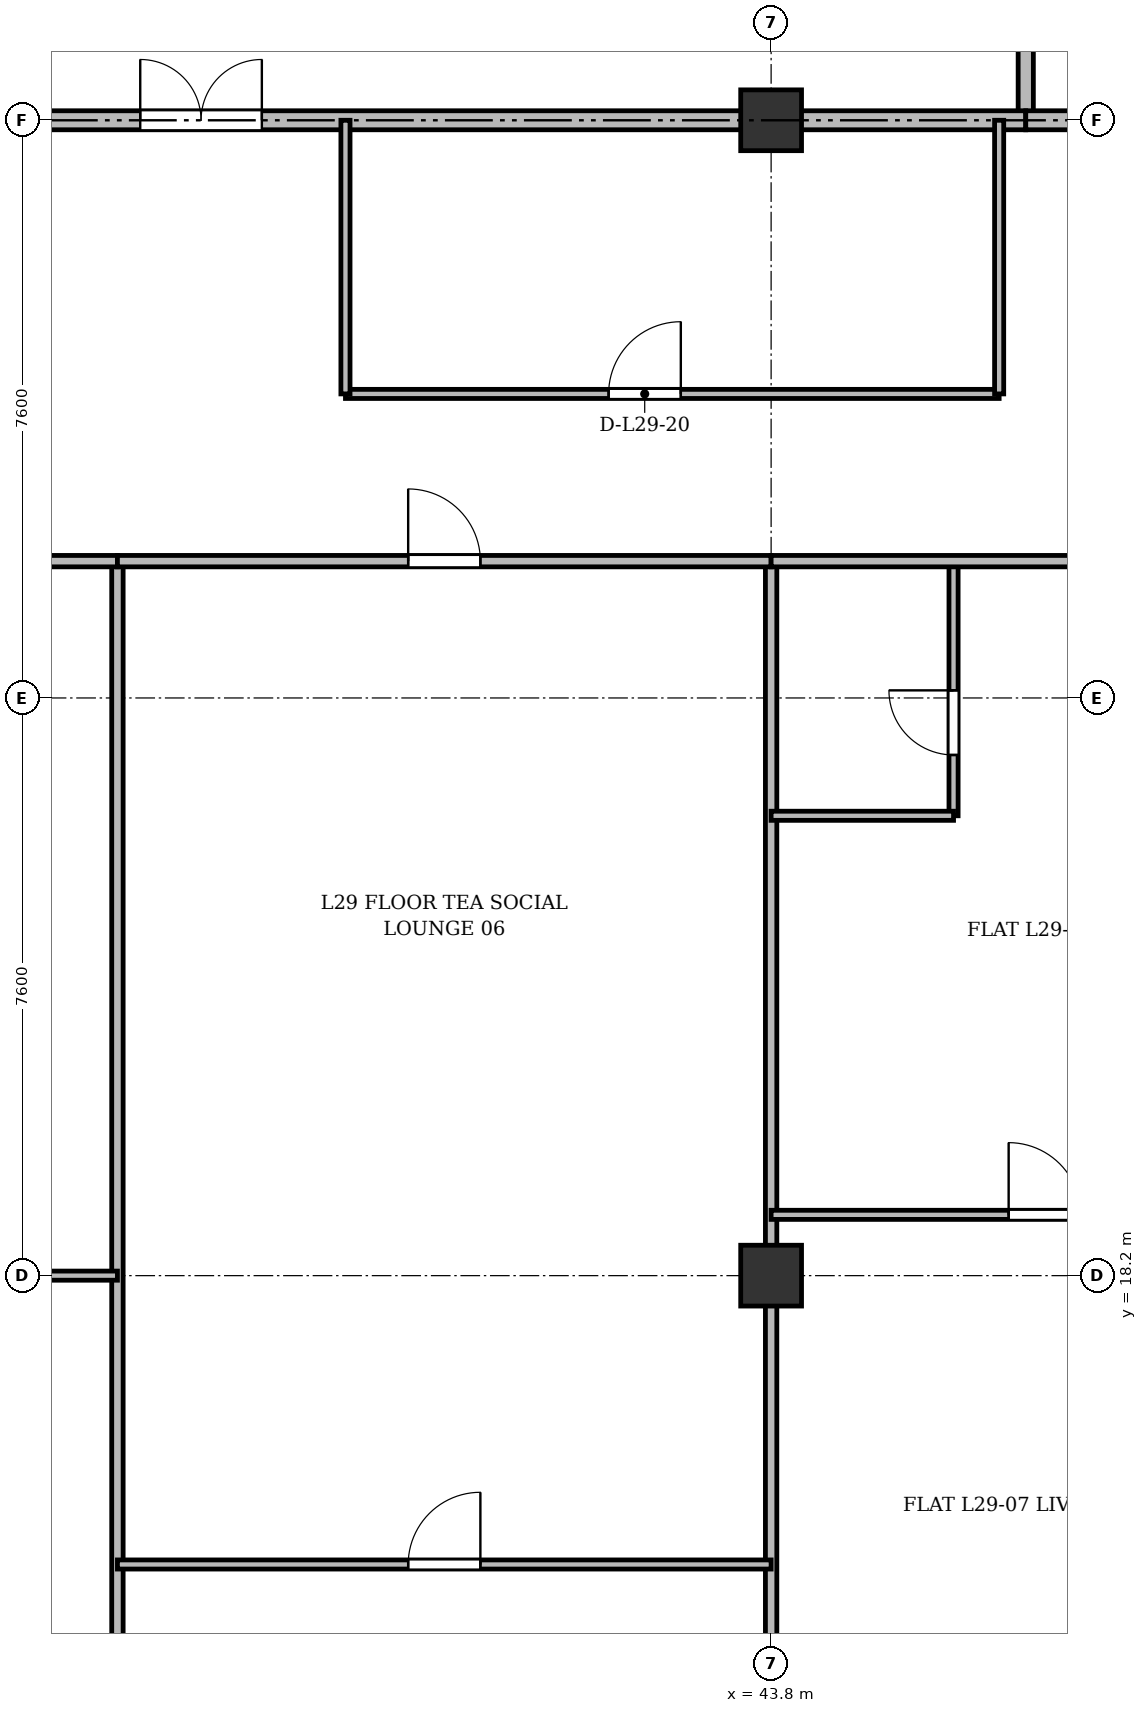
"""IFC4 building model, lengths in metres.
Left out: names, types, materials, properties, quantities, classifications, styles, units other than length and angle.
Written with IfcOpenShell. Run it as: python <this file> out.ifc"""

import sys

from ifc_helpers import new_model, si_unit, direction, frame, frame_2d, origin, origin_2d, place, context, subcontext, project, spatial, rectangle, extrude, source, transform, mapped, element, fill, save


model = new_model("IFC4")
c1 = context("Model", 3, precision=1e-05, world=origin(), true_north=direction((0.0, 1.0)))
c2 = subcontext(c1, "Body", "Model", "MODEL_VIEW")
j1 = project(units=[si_unit("LENGTHUNIT", "METRE"), si_unit("PLANEANGLEUNIT", "RADIAN")], contexts=[c1])
p1 = place(None, origin())
s1 = spatial("IfcSite", under=j1, at=p1, CompositionType="ELEMENT")
p2 = place(p1, origin())
s2 = spatial("IfcBuilding", under=s1, at=p2, CompositionType="ELEMENT")
p3 = place(p2, frame((0.0, 0.0, 114.1)))
s3 = spatial("IfcBuildingStorey", under=s2, at=p3, CompositionType="ELEMENT", Elevation=114.1)
m1 = source(origin(), c2, "Body", "SweptSolid", [
    extrude(rectangle(XDim=0.8, YDim=0.8, at=origin_2d()), origin(), (0.0, 0.0, 1.0), 3.6),
])
for number, where, z_axis, x_axis in (
    (1, (43.8, 18.2, 0.0), (0.0, 0.0, 1.0), (1.0, 0.0, 0.0)),
    (2, (43.8, 33.4, 0.0), (0.0, 0.0, 1.0), (1.0, 0.0, 0.0)),
):
    element("IfcColumn", number, at=place(p3, frame(where, z_axis=z_axis, x_axis=x_axis)), inside=s3, PredefinedType="COLUMN", context=c2, shape_type="MappedRepresentation", body=[
        mapped(m1, transform((0.0, 0.0, 0.0), x_axis=(1.0, 0.0, 0.0), y_axis=(0.0, 1.0, 0.0), z_axis=(0.0, 0.0, 1.0), scale=1.0)),
    ])
p4 = place(p3, frame((47.15, 33.4, 0.0), z_axis=(0.0, 0.0, 1.0), x_axis=(0.0, 1.0, 0.0)))
e3 = element("IfcWall", 3, at=p4, inside=s3, PredefinedType="SOLIDWALL", context=c2, shape_type="SweptSolid", body=[
    extrude(rectangle(XDim=11.3, YDim=0.2, at=frame_2d((5.65, 0.0))), origin(), (0.0, 0.0, 1.0), 2.752),
])
p5 = place(p3, frame((26.3, 33.4, 0.0), z_axis=(0.0, 0.0, 1.0), x_axis=(1.0, 0.0, 0.0)))
e4 = element("IfcWall", 4, at=p5, inside=s3, PredefinedType="PARTITIONING", context=c2, shape_type="SweptSolid", body=[
    extrude(rectangle(XDim=20.85, YDim=0.25, at=frame_2d((10.425, 0.0))), origin(), (0.0, 0.0, 1.0), 2.752),
])
p6 = place(p5, frame((9.2, 0.0, 0.0)))
e5 = element("IfcOpeningElement", 5, at=p6, cuts=e4, PredefinedType="OPENING", context=c2, shape_type="SweptSolid", body=[
    extrude(rectangle(XDim=1.6, YDim=2.2, at=frame_2d((0.8, 1.1))), frame((0.0, 0.135, 0.0), z_axis=(0.0, -1.0, 0.0), x_axis=(1.0, 0.0, 0.0)), (0.0, 0.0, 1.0), 0.27),
])
p7 = place(p3, frame((47.15, 33.4, 0.0), z_axis=(0.0, 0.0, 1.0), x_axis=(1.0, 0.0, 0.0)))
e6 = element("IfcWall", 6, at=p7, inside=s3, PredefinedType="PARTITIONING", context=c2, shape_type="SweptSolid", body=[
    extrude(rectangle(XDim=11.15, YDim=0.25, at=frame_2d((5.575, 0.0))), origin(), (0.0, 0.0, 1.0), 2.752),
])
p8 = place(p7, frame((0.7, 0.0, 0.0)))
e7 = element("IfcOpeningElement", 7, at=p8, cuts=e6, PredefinedType="OPENING", context=c2, shape_type="SweptSolid", body=[
    extrude(rectangle(XDim=0.95, YDim=2.15, at=frame_2d((0.475, 1.075))), frame((0.0, 0.135, 0.0), z_axis=(0.0, -1.0, 0.0), x_axis=(1.0, 0.0, 0.0)), (0.0, 0.0, 1.0), 0.27),
])
p9 = place(p7, frame((6.0, 0.0, 0.0)))
e8 = element("IfcOpeningElement", 8, at=p9, cuts=e6, PredefinedType="OPENING", context=c2, shape_type="SweptSolid", body=[
    extrude(rectangle(XDim=1.2, YDim=2.15, at=frame_2d((0.6, 1.075))), frame((0.0, 0.135, 0.0), z_axis=(0.0, -1.0, 0.0), x_axis=(1.0, 0.0, 0.0)), (0.0, 0.0, 1.0), 0.27),
])
p10 = place(p3, frame((38.2, 29.8, 0.0), z_axis=(0.0, 0.0, 1.0), x_axis=(1.0, 0.0, 0.0)))
e9 = element("IfcWall", 9, at=p10, inside=s3, PredefinedType="PARTITIONING", context=c2, shape_type="SweptSolid", body=[
    extrude(rectangle(XDim=8.6, YDim=0.12, at=frame_2d((4.3, 0.0))), origin(), (0.0, 0.0, 1.0), 2.84),
])
p11 = place(p10, frame((3.462, 0.0, 0.0)))
e10 = element("IfcOpeningElement", 10, at=p11, cuts=e9, PredefinedType="OPENING", context=c2, shape_type="SweptSolid", body=[
    extrude(rectangle(XDim=0.95, YDim=2.15, at=frame_2d((0.475, 1.075))), frame((0.0, 0.07, 0.0), z_axis=(0.0, -1.0, 0.0), x_axis=(1.0, 0.0, 0.0)), (0.0, 0.0, 1.0), 0.14),
])
for number, where, z_axis, x_axis in (
    (11, (38.2, 29.8, 0.0), (0.0, 0.0, 1.0), (0.0, 1.0, 0.0)),
    (12, (46.8, 29.8, 0.0), (0.0, 0.0, 1.0), (0.0, 1.0, 0.0)),
):
    element("IfcWall", number, at=place(p3, frame(where, z_axis=z_axis, x_axis=x_axis)), inside=s3, PredefinedType="PARTITIONING", context=c2, shape_type="SweptSolid", body=[
        extrude(rectangle(XDim=3.6, YDim=0.12, at=frame_2d((1.8, 0.0))), origin(), (0.0, 0.0, 1.0), 2.752),
    ])
p12 = place(p3, frame((35.2, 3.145, 0.0), z_axis=(0.0, 0.0, 1.0), x_axis=(0.0, 1.0, 0.0)))
e13 = element("IfcWall", 13, at=p12, inside=s3, PredefinedType="PARTITIONING", context=c2, shape_type="SweptSolid", body=[
    extrude(rectangle(XDim=24.455, YDim=0.15, at=frame_2d((12.228, 0.0))), origin(), (0.0, 0.0, 1.0), 2.752),
])
p13 = place(p3, frame((43.8, 3.145, 0.0), z_axis=(0.0, 0.0, 1.0), x_axis=(0.0, 1.0, 0.0)))
e14 = element("IfcWall", 14, at=p13, inside=s3, PredefinedType="PARTITIONING", context=c2, shape_type="SweptSolid", body=[
    extrude(rectangle(XDim=24.455, YDim=0.15, at=frame_2d((12.228, 0.0))), origin(), (0.0, 0.0, 1.0), 2.84),
])
p14 = place(p3, frame((27.8, 18.2, 0.0), z_axis=(0.0, 0.0, 1.0), x_axis=(1.0, 0.0, 0.0)))
e15 = element("IfcWall", 15, at=p14, inside=s3, PredefinedType="PARTITIONING", context=c2, shape_type="SweptSolid", body=[
    extrude(rectangle(XDim=7.4, YDim=0.12, at=frame_2d((3.7, 0.0))), origin(), (0.0, 0.0, 1.0), 2.752),
])
p15 = place(p14, frame((4.051, 0.0, 0.0)))
e16 = element("IfcOpeningElement", 16, at=p15, cuts=e15, PredefinedType="OPENING", context=c2, shape_type="SweptSolid", body=[
    extrude(rectangle(XDim=0.95, YDim=2.15, at=frame_2d((0.475, 1.075))), frame((0.0, 0.07, 0.0), z_axis=(0.0, -1.0, 0.0), x_axis=(1.0, 0.0, 0.0)), (0.0, 0.0, 1.0), 0.14),
])
p16 = place(p3, frame((27.8, 27.6, 0.0), z_axis=(0.0, 0.0, 1.0), x_axis=(1.0, 0.0, 0.0)))
e17 = element("IfcWall", 17, at=p16, inside=s3, PredefinedType="PARTITIONING", context=c2, shape_type="SweptSolid", body=[
    extrude(rectangle(XDim=7.4, YDim=0.15, at=frame_2d((3.7, 0.0))), origin(), (0.0, 0.0, 1.0), 2.84),
])
p17 = place(p16, frame((4.967, 0.0, 0.0)))
e18 = element("IfcOpeningElement", 18, at=p17, cuts=e17, PredefinedType="OPENING", context=c2, shape_type="SweptSolid", body=[
    extrude(rectangle(XDim=0.95, YDim=2.15, at=frame_2d((0.475, 1.075))), frame((0.0, 0.085, 0.0), z_axis=(0.0, -1.0, 0.0), x_axis=(1.0, 0.0, 0.0)), (0.0, 0.0, 1.0), 0.17),
])
p18 = place(p3, frame((35.2, 27.6, 0.0), z_axis=(0.0, 0.0, 1.0), x_axis=(1.0, 0.0, 0.0)))
e19 = element("IfcWall", 19, at=p18, inside=s3, PredefinedType="PARTITIONING", context=c2, shape_type="SweptSolid", body=[
    extrude(rectangle(XDim=8.6, YDim=0.15, at=frame_2d((4.3, 0.0))), origin(), (0.0, 0.0, 1.0), 2.84),
])
p19 = place(p18, frame((3.825, 0.0, 0.0)))
e20 = element("IfcOpeningElement", 20, at=p19, cuts=e19, PredefinedType="OPENING", context=c2, shape_type="SweptSolid", body=[
    extrude(rectangle(XDim=0.95, YDim=2.15, at=frame_2d((0.475, 1.075))), frame((0.0, 0.085, 0.0), z_axis=(0.0, -1.0, 0.0), x_axis=(1.0, 0.0, 0.0)), (0.0, 0.0, 1.0), 0.17),
])
p20 = place(p3, frame((35.2, 14.4, 0.0), z_axis=(0.0, 0.0, 1.0), x_axis=(1.0, 0.0, 0.0)))
e21 = element("IfcWall", 21, at=p20, inside=s3, PredefinedType="PARTITIONING", context=c2, shape_type="SweptSolid", body=[
    extrude(rectangle(XDim=8.6, YDim=0.12, at=frame_2d((4.3, 0.0))), origin(), (0.0, 0.0, 1.0), 2.84),
])
p21 = place(p20, frame((3.825, 0.0, 0.0)))
e22 = element("IfcOpeningElement", 22, at=p21, cuts=e21, PredefinedType="OPENING", context=c2, shape_type="SweptSolid", body=[
    extrude(rectangle(XDim=0.95, YDim=2.15, at=frame_2d((0.475, 1.075))), frame((0.0, 0.07, 0.0), z_axis=(0.0, -1.0, 0.0), x_axis=(1.0, 0.0, 0.0)), (0.0, 0.0, 1.0), 0.14),
])
p22 = place(p3, frame((43.8, 19.0, 0.0), z_axis=(0.0, 0.0, 1.0), x_axis=(1.0, 0.0, 0.0)))
e23 = element("IfcWall", 23, at=p22, inside=s3, PredefinedType="PARTITIONING", context=c2, shape_type="SweptSolid", body=[
    extrude(rectangle(XDim=7.2, YDim=0.12, at=frame_2d((3.6, 0.0))), origin(), (0.0, 0.0, 1.0), 2.84),
])
p23 = place(p22, frame((3.125, 0.0, 0.0)))
e24 = element("IfcOpeningElement", 24, at=p23, cuts=e23, PredefinedType="OPENING", context=c2, shape_type="SweptSolid", body=[
    extrude(rectangle(XDim=0.95, YDim=2.15, at=frame_2d((0.475, 1.075))), frame((0.0, 0.07, 0.0), z_axis=(0.0, -1.0, 0.0), x_axis=(1.0, 0.0, 0.0)), (0.0, 0.0, 1.0), 0.14),
])
p24 = place(p3, frame((46.2, 24.25, 0.0), z_axis=(0.0, 0.0, 1.0), x_axis=(0.0, 1.0, 0.0)))
e25 = element("IfcWall", 25, at=p24, inside=s3, PredefinedType="PARTITIONING", context=c2, shape_type="SweptSolid", body=[
    extrude(rectangle(XDim=3.35, YDim=0.12, at=frame_2d((1.675, 0.0))), origin(), (0.0, 0.0, 1.0), 2.99),
])
p25 = place(p24, frame((0.8, 0.0, 0.0)))
e26 = element("IfcOpeningElement", 26, at=p25, cuts=e25, PredefinedType="OPENING", context=c2, shape_type="SweptSolid", body=[
    extrude(rectangle(XDim=0.85, YDim=2.1, at=frame_2d((0.425, 1.05))), frame((0.0, 0.07, 0.0), z_axis=(0.0, -1.0, 0.0), x_axis=(1.0, 0.0, 0.0)), (0.0, 0.0, 1.0), 0.14),
])
p26 = place(p3, frame((43.8, 24.25, 0.0), z_axis=(0.0, 0.0, 1.0), x_axis=(1.0, 0.0, 0.0)))
e27 = element("IfcWall", 27, at=p26, inside=s3, PredefinedType="PARTITIONING", context=c2, shape_type="SweptSolid", body=[
    extrude(rectangle(XDim=2.4, YDim=0.12, at=frame_2d((1.2, 0.0))), origin(), (0.0, 0.0, 1.0), 2.84),
])
p27 = place(p3, frame((43.8, 27.6, 0.0), z_axis=(0.0, 0.0, 1.0), x_axis=(1.0, 0.0, 0.0)))
e28 = element("IfcWall", 28, at=p27, inside=s3, PredefinedType="PARTITIONING", context=c2, shape_type="SweptSolid", body=[
    extrude(rectangle(XDim=7.2, YDim=0.15, at=frame_2d((3.6, 0.0))), origin(), (0.0, 0.0, 1.0), 2.84),
])
p28 = place(p27, frame((4.706, 0.0, 0.0)))
e29 = element("IfcOpeningElement", 29, at=p28, cuts=e28, PredefinedType="OPENING", context=c2, shape_type="SweptSolid", body=[
    extrude(rectangle(XDim=0.95, YDim=2.15, at=frame_2d((0.475, 1.075))), frame((0.0, 0.085, 0.0), z_axis=(0.0, -1.0, 0.0), x_axis=(1.0, 0.0, 0.0)), (0.0, 0.0, 1.0), 0.17),
])
m2 = source(origin(), c2, "Body", "SweptSolid", [
    extrude(rectangle(XDim=1.6, YDim=2.2, at=frame_2d((0.8, 1.1))), frame((0.0, 0.025, 0.0), z_axis=(0.0, -1.0, 0.0), x_axis=(1.0, 0.0, 0.0)), (0.0, 0.0, 1.0), 0.05),
])
p29 = place(p6, origin())
e30 = element("IfcDoor", 30, at=p29, inside=s3, OperationType="DOUBLE_DOOR_SINGLE_SWING", PredefinedType="DOOR", context=c2, shape_type="MappedRepresentation", body=[
    mapped(m2, transform((0.0, 0.0, 0.0), x_axis=(1.0, 0.0, 0.0), y_axis=(0.0, 1.0, 0.0), z_axis=(0.0, 0.0, 1.0), scale=1.0)),
])
fill(e5, e30)
m3 = source(origin(), c2, "Body", "SweptSolid", [
    extrude(rectangle(XDim=0.95, YDim=2.15, at=frame_2d((0.475, 1.075))), frame((0.0, 0.025, 0.0), z_axis=(0.0, -1.0, 0.0), x_axis=(1.0, 0.0, 0.0)), (0.0, 0.0, 1.0), 0.05),
])
p30 = place(p11, origin())
e31 = element("IfcDoor", 31, at=p30, inside=s3, OperationType="SINGLE_SWING_RIGHT", PredefinedType="DOOR", context=c2, shape_type="MappedRepresentation", body=[
    mapped(m3, transform((0.0, 0.0, 0.0), x_axis=(1.0, 0.0, 0.0), y_axis=(0.0, 1.0, 0.0), z_axis=(0.0, 0.0, 1.0), scale=1.0)),
])
fill(e10, e31)
p31 = place(p19, origin())
e32 = element("IfcDoor", 32, at=p31, inside=s3, OperationType="SINGLE_SWING_LEFT", PredefinedType="DOOR", context=c2, shape_type="MappedRepresentation", body=[
    mapped(m3, transform((0.0, 0.0, 0.0), x_axis=(1.0, 0.0, 0.0), y_axis=(0.0, 1.0, 0.0), z_axis=(0.0, 0.0, 1.0), scale=1.0)),
])
fill(e20, e32)
p32 = place(p21, origin())
e33 = element("IfcDoor", 33, at=p32, inside=s3, OperationType="SINGLE_SWING_RIGHT", PredefinedType="DOOR", context=c2, shape_type="MappedRepresentation", body=[
    mapped(m3, transform((0.0, 0.0, 0.0), x_axis=(1.0, 0.0, 0.0), y_axis=(0.0, 1.0, 0.0), z_axis=(0.0, 0.0, 1.0), scale=1.0)),
])
fill(e22, e33)
p33 = place(p23, origin())
e34 = element("IfcDoor", 34, at=p33, inside=s3, OperationType="SINGLE_SWING_LEFT", PredefinedType="DOOR", context=c2, shape_type="MappedRepresentation", body=[
    mapped(m3, transform((0.0, 0.0, 0.0), x_axis=(1.0, 0.0, 0.0), y_axis=(0.0, 1.0, 0.0), z_axis=(0.0, 0.0, 1.0), scale=1.0)),
])
fill(e24, e34)
m4 = source(origin(), c2, "Body", "SweptSolid", [
    extrude(rectangle(XDim=0.85, YDim=2.1, at=frame_2d((0.425, 1.05))), frame((0.0, 0.025, 0.0), z_axis=(0.0, -1.0, 0.0), x_axis=(1.0, 0.0, 0.0)), (0.0, 0.0, 1.0), 0.05),
])
p34 = place(p25, origin())
e35 = element("IfcDoor", 35, at=p34, inside=s3, OperationType="SINGLE_SWING_RIGHT", PredefinedType="DOOR", context=c2, shape_type="MappedRepresentation", body=[
    mapped(m4, transform((0.0, 0.0, 0.0), x_axis=(1.0, 0.0, 0.0), y_axis=(0.0, 1.0, 0.0), z_axis=(0.0, 0.0, 1.0), scale=1.0)),
])
fill(e26, e35)
save(model, sys.argv[1])
